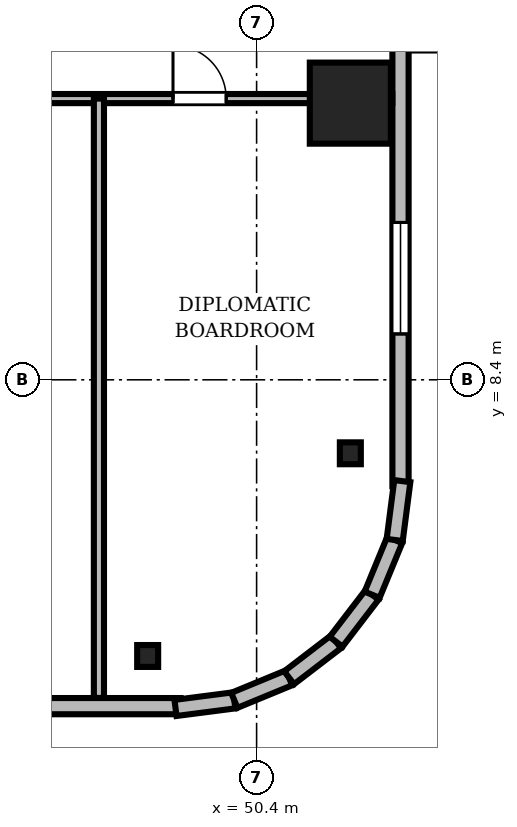
"""IFC4 building model, lengths in metres.
Left out: names, types, materials, properties, quantities, classifications, styles, units other than length and angle.
Written with IfcOpenShell. Run it as: python <this file> out.ifc"""

import sys

from ifc_helpers import new_model, si_unit, direction, frame, frame_2d, origin, origin_2d, place, context, subcontext, project, spatial, rectangle, i_section, extrude, source, transform, mapped, element, fill, save


model = new_model("IFC4")
c1 = context("Model", 3, precision=1e-05, world=origin(), true_north=direction((0.0, 1.0)))
c2 = subcontext(c1, "Body", "Model", "MODEL_VIEW")
j1 = project(units=[si_unit("LENGTHUNIT", "METRE"), si_unit("PLANEANGLEUNIT", "RADIAN")], contexts=[c1])
p1 = place(None, origin())
s1 = spatial("IfcSite", under=j1, at=p1, CompositionType="ELEMENT")
p2 = place(p1, origin())
s2 = spatial("IfcBuilding", under=s1, at=p2, CompositionType="ELEMENT")
p3 = place(p2, frame((0.0, 0.0, 152.0)))
s3 = spatial("IfcBuildingStorey", under=s2, at=p3, CompositionType="ELEMENT", Elevation=152.0)
m1 = source(origin(), c2, "Body", "SweptSolid", [
    extrude(rectangle(XDim=1.6, YDim=1.6, at=origin_2d()), origin(), (0.0, 0.0, 1.0), 3.46),
])
p4 = place(p3, frame((52.25, 13.86, 0.0), z_axis=(0.0, 0.0, 1.0), x_axis=(1.0, 0.0, 0.0)))
e1 = element("IfcColumn", 1, at=p4, inside=s3, PredefinedType="COLUMN", context=c2, shape_type="MappedRepresentation", body=[
    mapped(m1, transform((0.0, 0.0, 0.0), scale=1.0)),
])
m2 = source(origin(), c2, "Body", "SweptSolid", [
    extrude(i_section(OverallWidth=0.414, OverallDepth=0.432, WebThickness=0.026, FlangeThickness=0.04, FilletRadius=0.015, at=origin_2d()), origin(), (0.0, 0.0, 1.0), 3.46),
])
for number, where, z_axis, x_axis in (
    (2, (48.25, 2.95, 0.0), (0.0, 0.0, 1.0), (1.0, 0.0, 0.0)),
    (3, (52.25, 6.95, 0.0), (0.0, 0.0, 1.0), (1.0, 0.0, 0.0)),
):
    element("IfcColumn", number, at=place(p3, frame(where, z_axis=z_axis, x_axis=x_axis)), inside=s3, PredefinedType="COLUMN", context=c2, shape_type="MappedRepresentation", body=[
        mapped(m2, transform((0.0, 0.0, 0.0), scale=1.0)),
    ])
m3 = source(origin(), c2, "Body", "SweptSolid", [
    extrude(rectangle(XDim=15.6, YDim=0.32, at=frame_2d((7.8, 0.0))), origin(), (0.0, 0.0, 1.0), 3.46),
])
p5 = place(p3, frame((33.3, 1.96, 0.0), z_axis=(0.0, 0.0, 1.0), x_axis=(1.0, 0.0, 0.0)))
e4 = element("IfcWall", 4, at=p5, inside=s3, PredefinedType="SOLIDWALL", context=c2, shape_type="MappedRepresentation", body=[
    mapped(m3, transform((0.0, 0.0, 0.0), scale=1.0)),
])
m4 = source(origin(), c2, "Body", "SweptSolid", [
    extrude(rectangle(XDim=1.4, YDim=2.3, at=frame_2d((0.7, 1.15))), frame((0.0, 0.17, 0.0), z_axis=(0.0, -1.0, 0.0), x_axis=(1.0, 0.0, 0.0)), (0.0, 0.0, 1.0), 0.34),
])
p6 = place(p5, frame((4.59, 0.0, 0.0)))
e5 = element("IfcOpeningElement", 5, at=p6, cuts=e4, PredefinedType="OPENING", context=c2, shape_type="MappedRepresentation", body=[
    mapped(m4, transform((0.0, 0.0, 0.0), scale=1.0)),
])
m5 = source(origin(), c2, "Body", "SweptSolid", [
    extrude(rectangle(XDim=2.2, YDim=2.4, at=frame_2d((1.1, 1.2))), frame((0.0, 0.17, 0.0), z_axis=(0.0, -1.0, 0.0), x_axis=(1.0, 0.0, 0.0)), (0.0, 0.0, 1.0), 0.34),
])
p7 = place(p5, frame((10.395, 0.0, 0.72)))
e6 = element("IfcOpeningElement", 6, at=p7, cuts=e4, PredefinedType="OPENING", context=c2, shape_type="MappedRepresentation", body=[
    mapped(m5, transform((0.0, 0.0, 0.0), scale=1.0)),
])
p8 = place(p3, frame((53.24, 6.3, 0.0), z_axis=(0.0, 0.0, 1.0), x_axis=(0.0, 1.0, 0.0)))
e7 = element("IfcWall", 7, at=p8, inside=s3, PredefinedType="SOLIDWALL", context=c2, shape_type="MappedRepresentation", body=[
    mapped(m3, transform((0.0, 0.0, 0.0), scale=1.0)),
])
p9 = place(p8, frame((9.61, 0.0, 0.0)))
e8 = element("IfcOpeningElement", 8, at=p9, cuts=e7, PredefinedType="OPENING", context=c2, shape_type="MappedRepresentation", body=[
    mapped(m4, transform((0.0, 0.0, 0.0), scale=1.0)),
])
p10 = place(p8, frame((3.005, 0.0, 0.72)))
e9 = element("IfcOpeningElement", 9, at=p10, cuts=e7, PredefinedType="OPENING", context=c2, shape_type="MappedRepresentation", body=[
    mapped(m5, transform((0.0, 0.0, 0.0), scale=1.0)),
])
m6 = source(origin(), c2, "Body", "SweptSolid", [
    extrude(rectangle(XDim=1.17, YDim=0.32, at=frame_2d((0.585, 0.0))), origin(), (0.0, 0.0, 1.0), 3.46),
])
p11 = place(p3, frame((48.8, 1.925, 0.0), z_axis=(0.0, 0.0, 1.0), x_axis=(0.991762485493, 0.128090485085, 0.0)))
e10 = element("IfcWall", 10, at=p11, inside=s3, PredefinedType="SOLIDWALL", context=c2, shape_type="MappedRepresentation", body=[
    mapped(m6, transform((0.0, 0.0, 0.0), scale=1.0)),
])
m7 = source(origin(), c2, "Body", "SweptSolid", [
    extrude(rectangle(XDim=1.169, YDim=0.32, at=frame_2d((0.585, 0.0))), origin(), (0.0, 0.0, 1.0), 3.46),
])
p12 = place(p3, frame((49.96, 2.074, 0.0), z_axis=(0.0, 0.0, 1.0), x_axis=(0.924479075121, 0.381232789334, 0.0)))
e11 = element("IfcWall", 11, at=p12, inside=s3, PredefinedType="SOLIDWALL", context=c2, shape_type="MappedRepresentation", body=[
    mapped(m7, transform((0.0, 0.0, 0.0), scale=1.0)),
])
m8 = source(origin(), c2, "Body", "SweptSolid", [
    extrude(rectangle(XDim=1.169, YDim=0.32, at=frame_2d((0.584, 0.0))), origin(), (0.0, 0.0, 1.0), 3.46),
])
p13 = place(p3, frame((51.041, 2.52, 0.0), z_axis=(0.0, 0.0, 1.0), x_axis=(0.793663520347, 0.608356981114, 0.0)))
e12 = element("IfcWall", 12, at=p13, inside=s3, PredefinedType="SOLIDWALL", context=c2, shape_type="MappedRepresentation", body=[
    mapped(m8, transform((0.0, 0.0, 0.0), scale=1.0)),
])
m9 = source(origin(), c2, "Body", "SweptSolid", [
    extrude(rectangle(XDim=1.169, YDim=0.32, at=frame_2d((0.584, 0.0))), origin(), (0.0, 0.0, 1.0), 3.46),
])
for number, where, z_axis, x_axis in (
    (13, (51.969, 3.231, 0.0), (0.0, 0.0, 1.0), (0.608, 0.794, 0.0)),
    (14, (52.68, 4.159, 0.0), (0.0, 0.0, 1.0), (0.381, 0.925, 0.0)),
):
    element("IfcWall", number, at=place(p3, frame(where, z_axis=z_axis, x_axis=x_axis)), inside=s3, PredefinedType="SOLIDWALL", context=c2, shape_type="MappedRepresentation", body=[
        mapped(m9, transform((0.0, 0.0, 0.0), scale=1.0)),
    ])
m10 = source(origin(), c2, "Body", "SweptSolid", [
    extrude(rectangle(XDim=1.171, YDim=0.32, at=frame_2d((0.585, 0.0))), origin(), (0.0, 0.0, 1.0), 3.46),
])
p14 = place(p3, frame((53.125, 5.24, 0.0), z_axis=(0.0, 0.0, 1.0), x_axis=(0.128269133229, 0.991739395941, 0.0)))
e15 = element("IfcWall", 15, at=p14, inside=s3, PredefinedType="SOLIDWALL", context=c2, shape_type="MappedRepresentation", body=[
    mapped(m10, transform((0.0, 0.0, 0.0), scale=1.0)),
])
m11 = source(origin(), c2, "Body", "SweptSolid", [
    extrude(rectangle(XDim=46.156, YDim=0.18, at=frame_2d((23.078, 0.0))), origin(), (0.0, 0.0, 1.0), 2.702),
])
p15 = place(p3, frame((6.922, 13.95, 0.0), z_axis=(0.0, 0.0, 1.0), x_axis=(1.0, 0.0, 0.0)))
e16 = element("IfcWall", 16, at=p15, inside=s3, PredefinedType="PARTITIONING", context=c2, shape_type="MappedRepresentation", body=[
    mapped(m11, transform((0.0, 0.0, 0.0), scale=1.0)),
])
m12 = source(origin(), c2, "Body", "SweptSolid", [
    extrude(rectangle(XDim=1.05, YDim=2.2, at=frame_2d((0.525, 1.1))), frame((0.0, 0.1, 0.0), z_axis=(0.0, -1.0, 0.0), x_axis=(1.0, 0.0, 0.0)), (0.0, 0.0, 1.0), 0.2),
])
p16 = place(p15, frame((10.798, 0.0, 0.0)))
e17 = element("IfcOpeningElement", 17, at=p16, cuts=e16, PredefinedType="OPENING", context=c2, shape_type="MappedRepresentation", body=[
    mapped(m12, transform((0.0, 0.0, 0.0), scale=1.0)),
])
p17 = place(p15, frame((13.353, 0.0, 0.0)))
e18 = element("IfcOpeningElement", 18, at=p17, cuts=e16, PredefinedType="OPENING", context=c2, shape_type="MappedRepresentation", body=[
    mapped(m12, transform((0.0, 0.0, 0.0), scale=1.0)),
])
m13 = source(origin(), c2, "Body", "SweptSolid", [
    extrude(rectangle(XDim=0.95, YDim=2.15, at=frame_2d((0.475, 1.075))), frame((0.0, 0.1, 0.0), z_axis=(0.0, -1.0, 0.0), x_axis=(1.0, 0.0, 0.0)), (0.0, 0.0, 1.0), 0.2),
])
p18 = place(p15, frame((18.531, 0.0, 0.0)))
e19 = element("IfcOpeningElement", 19, at=p18, cuts=e16, PredefinedType="OPENING", context=c2, shape_type="MappedRepresentation", body=[
    mapped(m13, transform((0.0, 0.0, 0.0), scale=1.0)),
])
p19 = place(p15, frame((21.885, 0.0, 0.0)))
e20 = element("IfcOpeningElement", 20, at=p19, cuts=e16, PredefinedType="OPENING", context=c2, shape_type="MappedRepresentation", body=[
    mapped(m12, transform((0.0, 0.0, 0.0), scale=1.0)),
])
p20 = place(p15, frame((26.588, 0.0, 0.0)))
e21 = element("IfcOpeningElement", 21, at=p20, cuts=e16, PredefinedType="OPENING", context=c2, shape_type="MappedRepresentation", body=[
    mapped(m12, transform((0.0, 0.0, 0.0), scale=1.0)),
])
p21 = place(p15, frame((32.516, 0.0, 0.0)))
e22 = element("IfcOpeningElement", 22, at=p21, cuts=e16, PredefinedType="OPENING", context=c2, shape_type="MappedRepresentation", body=[
    mapped(m13, transform((0.0, 0.0, 0.0), scale=1.0)),
])
p22 = place(p15, frame((36.744, 0.0, 0.0)))
e23 = element("IfcOpeningElement", 23, at=p22, cuts=e16, PredefinedType="OPENING", context=c2, shape_type="MappedRepresentation", body=[
    mapped(m12, transform((0.0, 0.0, 0.0), scale=1.0)),
])
p23 = place(p15, frame((41.828, 0.0, 0.0)))
e24 = element("IfcOpeningElement", 24, at=p23, cuts=e16, PredefinedType="OPENING", context=c2, shape_type="MappedRepresentation", body=[
    mapped(m12, transform((0.0, 0.0, 0.0), scale=1.0)),
])
m14 = source(origin(), c2, "Body", "SweptSolid", [
    extrude(rectangle(XDim=11.828, YDim=0.2, at=frame_2d((5.914, 0.0))), origin(), (0.0, 0.0, 1.0), 2.702),
])
p24 = place(p3, frame((47.288, 2.122, 0.0), z_axis=(0.0, 0.0, 1.0), x_axis=(0.0, 1.0, 0.0)))
e25 = element("IfcWall", 25, at=p24, inside=s3, PredefinedType="PARTITIONING", context=c2, shape_type="MappedRepresentation", body=[
    mapped(m14, transform((0.0, 0.0, 0.0), scale=1.0)),
])
m15 = source(origin(), c2, "Body", "SweptSolid", [
    extrude(rectangle(XDim=2.2, YDim=2.4, at=frame_2d((1.1, 1.2))), frame((0.0, 0.03, 0.0), z_axis=(0.0, -1.0, 0.0), x_axis=(1.0, 0.0, 0.0)), (0.0, 0.0, 1.0), 0.06),
])
p25 = place(p10, origin())
e26 = element("IfcWindow", 26, at=p25, inside=s3, PartitioningType="SINGLE_PANEL", PredefinedType="WINDOW", context=c2, shape_type="MappedRepresentation", body=[
    mapped(m15, transform((0.0, 0.0, 0.0), scale=1.0)),
])
fill(e9, e26)
m16 = source(origin(), c2, "Body", "SweptSolid", [
    extrude(rectangle(XDim=1.05, YDim=2.2, at=frame_2d((0.525, 1.1))), frame((0.0, 0.025, 0.0), z_axis=(0.0, -1.0, 0.0), x_axis=(1.0, 0.0, 0.0)), (0.0, 0.0, 1.0), 0.05),
])
p26 = place(p23, origin())
e27 = element("IfcDoor", 27, at=p26, inside=s3, OperationType="SINGLE_SWING_LEFT", PredefinedType="DOOR", context=c2, shape_type="MappedRepresentation", body=[
    mapped(m16, transform((0.0, 0.0, 0.0), scale=1.0)),
])
fill(e24, e27)
save(model, sys.argv[1])
